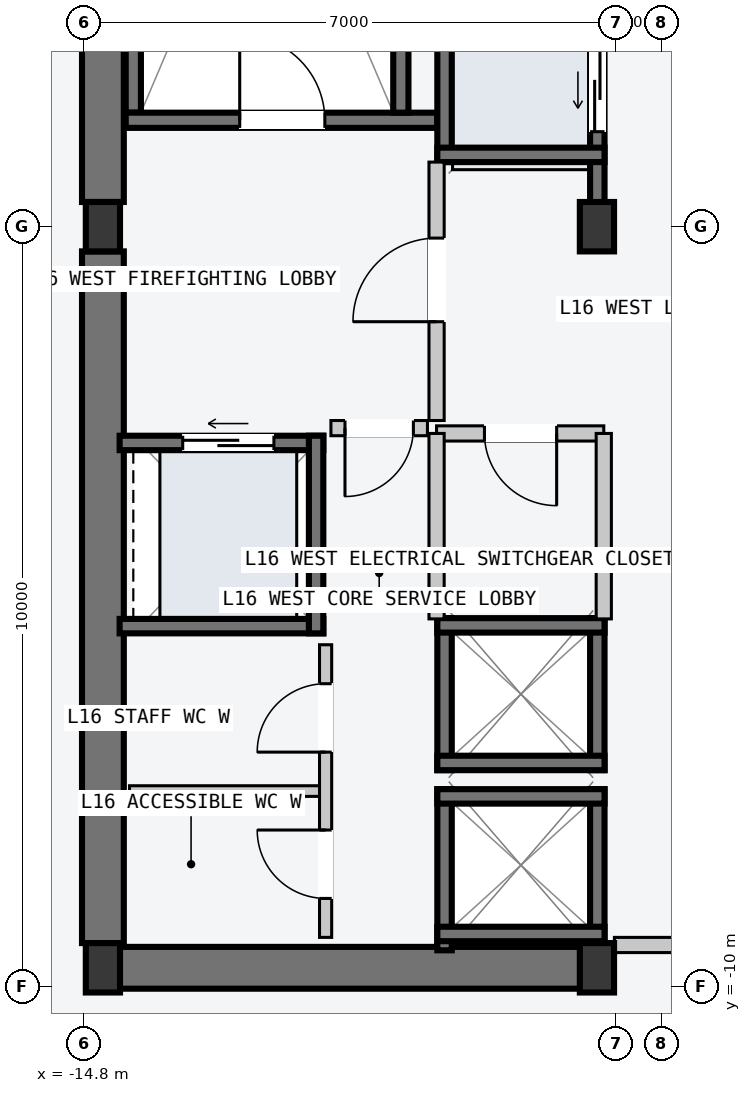
"""IFC4 building model, lengths in metres.
Left out: names, types, materials, properties, quantities, classifications, styles, units other than length and angle.
Written with IfcOpenShell. Run it as: python <this file> out.ifc"""

import sys

from ifc_helpers import new_model, si_unit, direction, frame, frame_2d, origin, origin_2d, place, context, subcontext, project, spatial, rectangle, i_section, extrude, element, fill, save


model = new_model("IFC4")
c1 = context("Model", 3, precision=1e-05, world=origin(), true_north=direction((0.0, 1.0)))
c2 = subcontext(c1, "Body", "Model", "MODEL_VIEW")
j1 = project(units=[si_unit("LENGTHUNIT", "METRE"), si_unit("PLANEANGLEUNIT", "RADIAN")], contexts=[c1])
p1 = place(None, origin())
s1 = spatial("IfcSite", under=j1, at=p1, CompositionType="ELEMENT")
p2 = place(p1, origin())
s2 = spatial("IfcBuilding", under=s1, at=p2, CompositionType="ELEMENT")
p3 = place(p2, frame((0.0, 0.0, 63.6)))
s3 = spatial("IfcBuildingStorey", under=s2, at=p3, CompositionType="ELEMENT", Elevation=63.6)
p4 = place(p3, frame((-14.53, -9.75, -0.2), z_axis=(0.0, 0.0, 1.0), x_axis=(1.0, 0.0, 0.0)))
e1 = element("IfcWall", 1, at=p4, inside=s3, PredefinedType="SHEAR", context=c2, shape_type="SweptSolid", body=[
    extrude(rectangle(XDim=6.46, YDim=0.55, at=frame_2d((3.23, 0.0))), origin(), (0.0, 0.0, 1.0), 3.6),
])
for number, where, z_axis, x_axis in (
    (2, (-14.55, -9.425, -0.2), (0.0, 0.0, 1.0), (0.0, 1.0, 0.0)),
    (3, (-14.55, 0.325, -0.2), (0.0, 0.0, 1.0), (0.0, 1.0, 0.0)),
):
    element("IfcWall", number, at=place(p3, frame(where, z_axis=z_axis, x_axis=x_axis)), inside=s3, PredefinedType="SHEAR", context=c2, shape_type="SweptSolid", body=[
        extrude(rectangle(XDim=9.1, YDim=0.55, at=frame_2d((4.55, 0.0))), origin(), (0.0, 0.0, 1.0), 3.6),
    ])
p5 = place(p3, frame((-14.15, 1.5, -0.2), z_axis=(0.0, 0.0, 1.0), x_axis=(0.0, 1.0, 0.0)))
e4 = element("IfcWall", 4, at=p5, inside=s3, PredefinedType="SOLIDWALL", context=c2, shape_type="SweptSolid", body=[
    extrude(rectangle(XDim=7.8, YDim=0.2, at=frame_2d((3.9, 0.0))), origin(), (0.0, 0.0, 1.0), 3.6),
])
p6 = place(p3, frame((-14.25, 1.4, -0.2), z_axis=(0.0, 0.0, 1.0), x_axis=(1.0, 0.0, 0.0)))
e5 = element("IfcWall", 5, at=p6, inside=s3, PredefinedType="SOLIDWALL", context=c2, shape_type="SweptSolid", body=[
    extrude(rectangle(XDim=4.1, YDim=0.2, at=frame_2d((2.05, 0.0))), origin(), (0.0, 0.0, 1.0), 3.6),
])
p7 = place(p6, frame((1.5, 0.0, 0.2)))
e6 = element("IfcOpeningElement", 6, at=p7, cuts=e5, PredefinedType="OPENING", context=c2, shape_type="SweptSolid", body=[
    extrude(rectangle(XDim=1.12, YDim=2.18, at=frame_2d((0.56, 1.09))), frame((0.0, 0.11, 0.0), z_axis=(0.0, -1.0, 0.0), x_axis=(1.0, 0.0, 0.0)), (0.0, 0.0, 1.0), 0.22),
])
p8 = place(p3, frame((-10.63, 1.5, -0.2), z_axis=(0.0, 0.0, 1.0), x_axis=(0.0, 1.0, 0.0)))
e7 = element("IfcWall", 7, at=p8, inside=s3, PredefinedType="SOLIDWALL", context=c2, shape_type="SweptSolid", body=[
    extrude(rectangle(XDim=7.8, YDim=0.2, at=frame_2d((3.9, 0.0))), origin(), (0.0, 0.0, 1.0), 3.6),
])
for number, where, z_axis, x_axis in (
    (8, (-14.55, -9.75, 0.0), (0.0, 0.0, 1.0), (1.0, 0.0, 0.0)),
    (9, (-14.55, 0.0, 0.0), (0.0, 0.0, 1.0), (1.0, 0.0, 0.0)),
    (10, (-8.05, -9.75, 0.0), (0.0, 0.0, 1.0), (1.0, 0.0, 0.0)),
    (11, (-8.05, 0.0, 0.0), (0.0, 0.0, 1.0), (1.0, 0.0, 0.0)),
):
    element("IfcColumn", number, at=place(p3, frame(where, z_axis=z_axis, x_axis=x_axis)), inside=s3, PredefinedType="COLUMN", context=c2, shape_type="SweptSolid", body=[
        extrude(i_section(OverallWidth=0.45, OverallDepth=0.65, WebThickness=0.025, FlangeThickness=0.04, at=origin_2d()), origin(), (0.0, 0.0, 1.0), 3.6),
    ])
p9 = place(p3, frame((-8.045, 0.21, -0.2), z_axis=(0.0, 0.0, 1.0), x_axis=(0.0, 1.0, 0.0)))
e12 = element("IfcWall", 12, at=p9, inside=s3, PredefinedType="SOLIDWALL", context=c2, shape_type="SweptSolid", body=[
    extrude(rectangle(XDim=2.54, YDim=0.19, at=frame_2d((1.27, 0.0))), origin(), (0.0, 0.0, 1.0), 3.6),
])
p10 = place(p9, frame((1.04, 0.0, 0.2)))
e13 = element("IfcOpeningElement", 13, at=p10, cuts=e12, PredefinedType="OPENING", context=c2, shape_type="SweptSolid", body=[
    extrude(rectangle(XDim=1.1, YDim=2.2, at=frame_2d((0.55, 1.1))), frame((0.0, 0.105, 0.0), z_axis=(0.0, -1.0, 0.0), x_axis=(1.0, 0.0, 0.0)), (0.0, 0.0, 1.0), 0.21),
])
p11 = place(p3, frame((-10.055, 0.85, -0.2), z_axis=(0.0, 0.0, 1.0), x_axis=(0.0, 1.0, 0.0)))
e14 = element("IfcWall", 14, at=p11, inside=s3, PredefinedType="SOLIDWALL", context=c2, shape_type="SweptSolid", body=[
    extrude(rectangle(XDim=1.9, YDim=0.19, at=frame_2d((0.95, 0.0))), origin(), (0.0, 0.0, 1.0), 3.6),
])
p12 = place(p3, frame((-10.15, 0.945, -0.2), z_axis=(0.0, 0.0, 1.0), x_axis=(1.0, 0.0, 0.0)))
e15 = element("IfcWall", 15, at=p12, inside=s3, PredefinedType="SOLIDWALL", context=c2, shape_type="SweptSolid", body=[
    extrude(rectangle(XDim=2.2, YDim=0.19, at=frame_2d((1.1, 0.0))), origin(), (0.0, 0.0, 1.0), 3.6),
])
for number, where, z_axis, x_axis in (
    (16, (-8.045, -9.52, -0.2), (0.0, 0.0, 1.0), (0.0, 1.0, 0.0)),
    (17, (-10.055, -9.52, -0.2), (0.0, 0.0, 1.0), (0.0, 1.0, 0.0)),
):
    element("IfcWall", number, at=place(p3, frame(where, z_axis=z_axis, x_axis=x_axis)), inside=s3, PredefinedType="SOLIDWALL", context=c2, shape_type="SweptSolid", body=[
        extrude(rectangle(XDim=2.12, YDim=0.19, at=frame_2d((1.06, 0.0))), origin(), (0.0, 0.0, 1.0), 3.6),
    ])
for number, where, z_axis, x_axis in (
    (18, (-10.15, -7.495, -0.2), (0.0, 0.0, 1.0), (1.0, 0.0, 0.0)),
    (19, (-10.15, -9.305, -0.2), (0.0, 0.0, 1.0), (1.0, 0.0, 0.0)),
):
    element("IfcWall", number, at=place(p3, frame(where, z_axis=z_axis, x_axis=x_axis)), inside=s3, PredefinedType="SOLIDWALL", context=c2, shape_type="SweptSolid", body=[
        extrude(rectangle(XDim=2.2, YDim=0.19, at=frame_2d((1.1, 0.0))), origin(), (0.0, 0.0, 1.0), 3.6),
    ])
for number, where, z_axis, x_axis in (
    (20, (-8.045, -7.15, -0.2), (0.0, 0.0, 1.0), (0.0, 1.0, 0.0)),
    (21, (-10.055, -7.15, -0.2), (0.0, 0.0, 1.0), (0.0, 1.0, 0.0)),
):
    element("IfcWall", number, at=place(p3, frame(where, z_axis=z_axis, x_axis=x_axis)), inside=s3, PredefinedType="SOLIDWALL", context=c2, shape_type="SweptSolid", body=[
        extrude(rectangle(XDim=2.0, YDim=0.19, at=frame_2d((1.0, 0.0))), origin(), (0.0, 0.0, 1.0), 3.6),
    ])
for number, where, z_axis, x_axis in (
    (22, (-10.15, -5.245, -0.2), (0.0, 0.0, 1.0), (1.0, 0.0, 0.0)),
    (23, (-10.15, -7.055, -0.2), (0.0, 0.0, 1.0), (1.0, 0.0, 0.0)),
):
    element("IfcWall", number, at=place(p3, frame(where, z_axis=z_axis, x_axis=x_axis)), inside=s3, PredefinedType="SOLIDWALL", context=c2, shape_type="SweptSolid", body=[
        extrude(rectangle(XDim=2.2, YDim=0.19, at=frame_2d((1.1, 0.0))), origin(), (0.0, 0.0, 1.0), 3.6),
    ])
p13 = place(p3, frame((-14.33, -2.845, -0.2), z_axis=(0.0, 0.0, 1.0), x_axis=(1.0, 0.0, 0.0)))
e24 = element("IfcWall", 24, at=p13, inside=s3, PredefinedType="SOLIDWALL", context=c2, shape_type="SweptSolid", body=[
    extrude(rectangle(XDim=2.68, YDim=0.19, at=frame_2d((1.34, 0.0))), origin(), (0.0, 0.0, 1.0), 3.6),
])
p14 = place(p13, frame((0.83, 0.0, 0.2)))
e25 = element("IfcOpeningElement", 25, at=p14, cuts=e24, PredefinedType="OPENING", context=c2, shape_type="SweptSolid", body=[
    extrude(rectangle(XDim=1.2, YDim=2.2, at=frame_2d((0.6, 1.1))), frame((0.0, 0.105, 0.0), z_axis=(0.0, -1.0, 0.0), x_axis=(1.0, 0.0, 0.0)), (0.0, 0.0, 1.0), 0.21),
])
p15 = place(p3, frame((-14.33, -5.255, -0.2), z_axis=(0.0, 0.0, 1.0), x_axis=(1.0, 0.0, 0.0)))
e26 = element("IfcWall", 26, at=p15, inside=s3, PredefinedType="SOLIDWALL", context=c2, shape_type="SweptSolid", body=[
    extrude(rectangle(XDim=2.68, YDim=0.19, at=frame_2d((1.34, 0.0))), origin(), (0.0, 0.0, 1.0), 3.6),
])
p16 = place(p3, frame((-11.745, -5.35, -0.2), z_axis=(0.0, 0.0, 1.0), x_axis=(0.0, 1.0, 0.0)))
e27 = element("IfcWall", 27, at=p16, inside=s3, PredefinedType="SOLIDWALL", context=c2, shape_type="SweptSolid", body=[
    extrude(rectangle(XDim=2.6, YDim=0.19, at=frame_2d((1.3, 0.0))), origin(), (0.0, 0.0, 1.0), 3.6),
])
p17 = place(p3, frame((-6.02, -9.45, 0.0), z_axis=(0.0, 0.0, 1.0), x_axis=(-1.0, 0.0, 0.0)))
e28 = element("IfcWall", 28, at=p17, inside=s3, PredefinedType="PARTITIONING", context=c2, shape_type="SweptSolid", body=[
    extrude(rectangle(XDim=1.8, YDim=0.2, at=frame_2d((0.9, 0.0))), origin(), (0.0, 0.0, 1.0), 3.4),
])
p18 = place(p3, frame((-10.16, -2.55, 0.0), z_axis=(0.0, 0.0, 1.0), x_axis=(0.0, 1.0, 0.0)))
e29 = element("IfcWall", 29, at=p18, inside=s3, PredefinedType="PARTITIONING", context=c2, shape_type="SweptSolid", body=[
    extrude(rectangle(XDim=3.4, YDim=0.2, at=frame_2d((1.7, 0.0))), origin(), (0.0, 0.0, 1.0), 3.4),
])
p19 = place(p18, frame((1.3, 0.0, 0.0)))
e30 = element("IfcOpeningElement", 30, at=p19, cuts=e29, PredefinedType="OPENING", context=c2, shape_type="SweptSolid", body=[
    extrude(rectangle(XDim=1.1, YDim=2.15, at=frame_2d((0.55, 1.075))), frame((0.0, 0.11, 0.0), z_axis=(0.0, -1.0, 0.0), x_axis=(1.0, 0.0, 0.0)), (0.0, 0.0, 1.0), 0.22),
])
p20 = place(p3, frame((-10.28, -2.65, 0.0), z_axis=(0.0, 0.0, 1.0), x_axis=(-1.0, 0.0, 0.0)))
e31 = element("IfcWall", 31, at=p20, inside=s3, PredefinedType="PARTITIONING", context=c2, shape_type="SweptSolid", body=[
    extrude(rectangle(XDim=1.27, YDim=0.2, at=frame_2d((0.635, 0.0))), origin(), (0.0, 0.0, 1.0), 3.4),
])
p21 = place(p20, frame((0.185, 0.0, 0.0)))
e32 = element("IfcOpeningElement", 32, at=p21, cuts=e31, PredefinedType="OPENING", context=c2, shape_type="SweptSolid", body=[
    extrude(rectangle(XDim=0.9, YDim=2.15, at=frame_2d((0.45, 1.075))), frame((0.0, 0.11, 0.0), z_axis=(0.0, -1.0, 0.0), x_axis=(1.0, 0.0, 0.0)), (0.0, 0.0, 1.0), 0.22),
])
p22 = place(p3, frame((-7.96, -2.72, 0.0), z_axis=(0.0, 0.0, 1.0), x_axis=(-1.0, 0.0, 0.0)))
e33 = element("IfcWall", 33, at=p22, inside=s3, PredefinedType="PARTITIONING", context=c2, shape_type="SweptSolid", body=[
    extrude(rectangle(XDim=2.2, YDim=0.2, at=frame_2d((1.1, 0.0))), origin(), (0.0, 0.0, 1.0), 3.4),
])
p23 = place(p22, frame((0.62, 0.0, 0.0)))
e34 = element("IfcOpeningElement", 34, at=p23, cuts=e33, PredefinedType="OPENING", context=c2, shape_type="SweptSolid", body=[
    extrude(rectangle(XDim=0.95, YDim=2.1, at=frame_2d((0.475, 1.05))), frame((0.0, 0.11, 0.0), z_axis=(0.0, -1.0, 0.0), x_axis=(1.0, 0.0, 0.0)), (0.0, 0.0, 1.0), 0.22),
])
for number, where, z_axis, x_axis in (
    (35, (-7.96, -5.16, 0.0), (0.0, 0.0, 1.0), (0.0, 1.0, 0.0)),
    (36, (-10.16, -5.16, 0.0), (0.0, 0.0, 1.0), (0.0, 1.0, 0.0)),
):
    element("IfcWall", number, at=place(p3, frame(where, z_axis=z_axis, x_axis=x_axis)), inside=s3, PredefinedType="PARTITIONING", context=c2, shape_type="SweptSolid", body=[
        extrude(rectangle(XDim=2.44, YDim=0.2, at=frame_2d((1.22, 0.0))), origin(), (0.0, 0.0, 1.0), 3.4),
    ])
p24 = place(p3, frame((-11.7, -7.425, 0.0), z_axis=(0.0, 0.0, 1.0), x_axis=(-1.0, 0.0, 0.0)))
e37 = element("IfcWall", 37, at=p24, inside=s3, PredefinedType="PARTITIONING", context=c2, shape_type="SweptSolid", body=[
    extrude(rectangle(XDim=2.5, YDim=0.14, at=frame_2d((1.25, 0.0))), origin(), (0.0, 0.0, 1.0), 3.4),
])
p25 = place(p3, frame((-11.62, -9.35, 0.0), z_axis=(0.0, 0.0, 1.0), x_axis=(0.0, 1.0, 0.0)))
e38 = element("IfcWall", 38, at=p25, inside=s3, PredefinedType="PARTITIONING", context=c2, shape_type="SweptSolid", body=[
    extrude(rectangle(XDim=3.85, YDim=0.16, at=frame_2d((1.925, 0.0))), origin(), (0.0, 0.0, 1.0), 3.4),
])
p26 = place(p25, frame((0.512, 0.0, 0.0)))
e39 = element("IfcOpeningElement", 39, at=p26, cuts=e38, PredefinedType="OPENING", context=c2, shape_type="SweptSolid", body=[
    extrude(rectangle(XDim=0.9, YDim=2.15, at=frame_2d((0.45, 1.075))), frame((0.0, 0.09, 0.0), z_axis=(0.0, -1.0, 0.0), x_axis=(1.0, 0.0, 0.0)), (0.0, 0.0, 1.0), 0.18),
])
p27 = place(p25, frame((2.438, 0.0, 0.0)))
e40 = element("IfcOpeningElement", 40, at=p27, cuts=e38, PredefinedType="OPENING", context=c2, shape_type="SweptSolid", body=[
    extrude(rectangle(XDim=0.9, YDim=2.15, at=frame_2d((0.45, 1.075))), frame((0.0, 0.09, 0.0), z_axis=(0.0, -1.0, 0.0), x_axis=(1.0, 0.0, 0.0)), (0.0, 0.0, 1.0), 0.18),
])
p28 = place(p7, origin())
e41 = element("IfcDoor", 41, at=p28, inside=s3, OperationType="SINGLE_SWING_LEFT", PredefinedType="DOOR", context=c2, shape_type="SweptSolid", body=[
    extrude(rectangle(XDim=1.12, YDim=2.18, at=frame_2d((0.56, 1.09))), frame((0.0, 0.025, 0.0), z_axis=(0.0, -1.0, 0.0), x_axis=(1.0, 0.0, 0.0)), (0.0, 0.0, 1.0), 0.05),
])
fill(e6, e41)
p29 = place(p10, origin())
e42 = element("IfcDoor", 42, at=p29, inside=s3, OperationType="SLIDING_TO_LEFT", PredefinedType="DOOR", context=c2, shape_type="SweptSolid", body=[
    extrude(rectangle(XDim=1.1, YDim=2.2, at=frame_2d((0.55, 1.1))), frame((0.0, 0.025, 0.0), z_axis=(0.0, -1.0, 0.0), x_axis=(1.0, 0.0, 0.0)), (0.0, 0.0, 1.0), 0.05),
])
fill(e13, e42)
p30 = place(p14, origin())
e43 = element("IfcDoor", 43, at=p30, inside=s3, OperationType="SLIDING_TO_LEFT", PredefinedType="DOOR", context=c2, shape_type="SweptSolid", body=[
    extrude(rectangle(XDim=1.2, YDim=2.2, at=frame_2d((0.6, 1.1))), frame((0.0, 0.025, 0.0), z_axis=(0.0, -1.0, 0.0), x_axis=(1.0, 0.0, 0.0)), (0.0, 0.0, 1.0), 0.05),
])
fill(e25, e43)
p31 = place(p19, origin())
e44 = element("IfcDoor", 44, at=p31, inside=s3, OperationType="SINGLE_SWING_LEFT", PredefinedType="DOOR", context=c2, shape_type="SweptSolid", body=[
    extrude(rectangle(XDim=1.1, YDim=2.15, at=frame_2d((0.55, 1.075))), frame((0.0, 0.025, 0.0), z_axis=(0.0, -1.0, 0.0), x_axis=(1.0, 0.0, 0.0)), (0.0, 0.0, 1.0), 0.05),
])
fill(e30, e44)
p32 = place(p21, origin())
e45 = element("IfcDoor", 45, at=p32, inside=s3, OperationType="SINGLE_SWING_RIGHT", PredefinedType="DOOR", context=c2, shape_type="SweptSolid", body=[
    extrude(rectangle(XDim=0.9, YDim=2.15, at=frame_2d((0.45, 1.075))), frame((0.0, 0.025, 0.0), z_axis=(0.0, -1.0, 0.0), x_axis=(1.0, 0.0, 0.0)), (0.0, 0.0, 1.0), 0.05),
])
fill(e32, e45)
p33 = place(p23, origin())
e46 = element("IfcDoor", 46, at=p33, inside=s3, OperationType="SINGLE_SWING_LEFT", PredefinedType="DOOR", context=c2, shape_type="SweptSolid", body=[
    extrude(rectangle(XDim=0.95, YDim=2.1, at=frame_2d((0.475, 1.05))), frame((0.0, 0.025, 0.0), z_axis=(0.0, -1.0, 0.0), x_axis=(1.0, 0.0, 0.0)), (0.0, 0.0, 1.0), 0.05),
])
fill(e34, e46)
p34 = place(p26, origin())
e47 = element("IfcDoor", 47, at=p34, inside=s3, OperationType="SINGLE_SWING_RIGHT", PredefinedType="DOOR", context=c2, shape_type="SweptSolid", body=[
    extrude(rectangle(XDim=0.9, YDim=2.15, at=frame_2d((0.45, 1.075))), frame((0.0, 0.025, 0.0), z_axis=(0.0, -1.0, 0.0), x_axis=(1.0, 0.0, 0.0)), (0.0, 0.0, 1.0), 0.05),
])
fill(e39, e47)
p35 = place(p27, origin())
e48 = element("IfcDoor", 48, at=p35, inside=s3, OperationType="SINGLE_SWING_LEFT", PredefinedType="DOOR", context=c2, shape_type="SweptSolid", body=[
    extrude(rectangle(XDim=0.9, YDim=2.15, at=frame_2d((0.45, 1.075))), frame((0.0, 0.025, 0.0), z_axis=(0.0, -1.0, 0.0), x_axis=(1.0, 0.0, 0.0)), (0.0, 0.0, 1.0), 0.05),
])
fill(e40, e48)
save(model, sys.argv[1])
